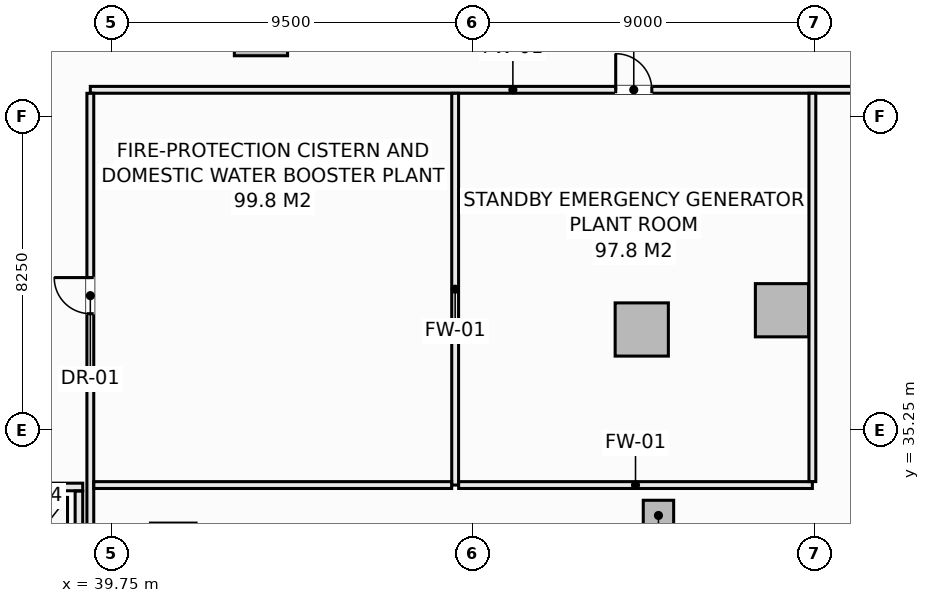
"""IFC4 building model, lengths in metres.
Left out: names, types, materials, properties, quantities, classifications, styles, units other than length and angle.
Written with IfcOpenShell. Run it as: python <this file> out.ifc"""

import sys

from ifc_helpers import new_model, si_unit, direction, frame, frame_2d, origin, origin_2d, place, context, subcontext, project, spatial, rectangle, extrude, element, fill, save


model = new_model("IFC4")
c1 = context("Model", 3, precision=1e-05, world=origin(), true_north=direction((0.0, 1.0)))
c2 = subcontext(c1, "Body", "Model", "MODEL_VIEW")
j1 = project(units=[si_unit("LENGTHUNIT", "METRE"), si_unit("PLANEANGLEUNIT", "RADIAN")], contexts=[c1])
p1 = place(None, origin())
s1 = spatial("IfcSite", under=j1, at=p1, CompositionType="ELEMENT")
p2 = place(p1, origin())
s2 = spatial("IfcBuilding", under=s1, at=p2, CompositionType="ELEMENT")
p3 = place(p2, frame((0.0, 0.0, -13.5)))
s3 = spatial("IfcBuildingStorey", under=s2, at=p3, CompositionType="ELEMENT", Elevation=-13.5)
for number, where, z_axis, x_axis in (
    (1, (53.71, 37.894, -0.5), (0.0, 0.0, 1.0), (1.0, 0.0, 0.0)),
    (2, (43.69, 45.796, -0.5), (0.0, 0.0, 1.0), (1.0, 0.0, 0.0)),
    (3, (57.4, 38.4, -0.5), (0.0, 0.0, 1.0), (1.0, 0.0, 0.0)),
):
    element("IfcColumn", number, at=place(p3, frame(where, z_axis=z_axis, x_axis=x_axis)), inside=s3, PredefinedType="COLUMN", context=c2, shape_type="SweptSolid", body=[
        extrude(rectangle(XDim=1.4, YDim=1.4, at=origin_2d()), origin(), (0.0, 0.0, 1.0), 4.68),
    ])
p4 = place(p3, frame((54.15, 33.0, -0.5), z_axis=(0.0, 0.0, 1.0), x_axis=(1.0, 0.0, 0.0)))
e4 = element("IfcColumn", 4, at=p4, inside=s3, PredefinedType="PILASTER", context=c2, shape_type="SweptSolid", body=[
    extrude(rectangle(XDim=0.8, YDim=0.8, at=origin_2d()), origin(), (0.0, 0.0, 1.0), 4.68),
])
p5 = place(p3, frame((36.75, 33.75, 0.0), z_axis=(0.0, 0.0, 1.0), x_axis=(1.0, 0.0, 0.0)))
e5 = element("IfcWall", 5, at=p5, inside=s3, PredefinedType="SOLIDWALL", context=c2, shape_type="SweptSolid", body=[
    extrude(rectangle(XDim=2.25, YDim=0.2, at=frame_2d((1.125, 0.0))), origin(), (0.0, 0.0, 1.0), 4.18),
])
p6 = place(p3, frame((38.9, 31.21, 0.0), z_axis=(0.0, 0.0, 1.0), x_axis=(0.0, 1.0, 0.0)))
e6 = element("IfcWall", 6, at=p6, inside=s3, PredefinedType="SOLIDWALL", context=c2, shape_type="SweptSolid", body=[
    extrude(rectangle(XDim=2.43, YDim=0.2, at=frame_2d((1.215, 0.0))), origin(), (0.0, 0.0, 1.0), 4.18),
])
p7 = place(p3, frame((39.2, 44.2, 0.0), z_axis=(0.0, 0.0, 1.0), x_axis=(1.0, 0.0, 0.0)))
e7 = element("IfcWall", 7, at=p7, inside=s3, PredefinedType="SOLIDWALL", context=c2, shape_type="SweptSolid", body=[
    extrude(rectangle(XDim=22.238, YDim=0.18, at=frame_2d((11.119, 0.0))), origin(), (0.0, 0.0, 1.0), 3.703),
])
p8 = place(p7, frame((13.825, 0.0, 0.0)))
e8 = element("IfcOpeningElement", 8, at=p8, cuts=e7, PredefinedType="OPENING", context=c2, shape_type="SweptSolid", body=[
    extrude(rectangle(XDim=0.95, YDim=2.1, at=frame_2d((0.475, 1.05))), frame((0.0, 0.1, 0.0), z_axis=(0.0, -1.0, 0.0), x_axis=(1.0, 0.0, 0.0)), (0.0, 0.0, 1.0), 0.2),
])
p9 = place(p3, frame((39.2, 28.997, 0.0), z_axis=(0.0, 0.0, 1.0), x_axis=(0.0, 1.0, 0.0)))
e9 = element("IfcWall", 9, at=p9, inside=s3, PredefinedType="SOLIDWALL", context=c2, shape_type="SweptSolid", body=[
    extrude(rectangle(XDim=15.111, YDim=0.18, at=frame_2d((7.555, 0.0))), origin(), (0.0, 0.0, 1.0), 3.414),
])
p10 = place(p9, frame((9.312, 0.0, 0.0)))
e10 = element("IfcOpeningElement", 10, at=p10, cuts=e9, PredefinedType="OPENING", context=c2, shape_type="SweptSolid", body=[
    extrude(rectangle(XDim=0.95, YDim=2.1, at=frame_2d((0.475, 1.05))), frame((0.0, 0.1, 0.0), z_axis=(0.0, -1.0, 0.0), x_axis=(1.0, 0.0, 0.0)), (0.0, 0.0, 1.0), 0.2),
])
p11 = place(p3, frame((48.8, 33.8, 0.0), z_axis=(0.0, 0.0, 1.0), x_axis=(0.0, 1.0, 0.0)))
e11 = element("IfcWall", 11, at=p11, inside=s3, PredefinedType="SOLIDWALL", context=c2, shape_type="SweptSolid", body=[
    extrude(rectangle(XDim=10.308, YDim=0.18, at=frame_2d((5.154, 0.0))), origin(), (0.0, 0.0, 1.0), 4.18),
])
p12 = place(p3, frame((39.292, 33.8, 0.0), z_axis=(0.0, 0.0, 1.0), x_axis=(1.0, 0.0, 0.0)))
e12 = element("IfcWall", 12, at=p12, inside=s3, PredefinedType="SOLIDWALL", context=c2, shape_type="SweptSolid", body=[
    extrude(rectangle(XDim=9.416, YDim=0.18, at=frame_2d((4.708, 0.0))), origin(), (0.0, 0.0, 1.0), 3.815),
])
p13 = place(p3, frame((48.892, 33.8, 0.0), z_axis=(0.0, 0.0, 1.0), x_axis=(1.0, 0.0, 0.0)))
e13 = element("IfcWall", 13, at=p13, inside=s3, PredefinedType="SOLIDWALL", context=c2, shape_type="SweptSolid", body=[
    extrude(rectangle(XDim=9.308, YDim=0.18, at=frame_2d((4.654, 0.0))), origin(), (0.0, 0.0, 1.0), 4.18),
])
p14 = place(p3, frame((58.2, 33.892, 0.0), z_axis=(0.0, 0.0, 1.0), x_axis=(0.0, 1.0, 0.0)))
e14 = element("IfcWall", 14, at=p14, inside=s3, PredefinedType="SOLIDWALL", context=c2, shape_type="SweptSolid", body=[
    extrude(rectangle(XDim=10.216, YDim=0.18, at=frame_2d((5.108, 0.0))), origin(), (0.0, 0.0, 1.0), 4.18),
])
p15 = place(p10, origin())
e15 = element("IfcDoor", 15, at=p15, inside=s3, OperationType="SINGLE_SWING_RIGHT", PredefinedType="DOOR", context=c2, shape_type="SweptSolid", body=[
    extrude(rectangle(XDim=0.95, YDim=2.1, at=frame_2d((0.475, 1.05))), frame((0.0, 0.025, 0.0), z_axis=(0.0, -1.0, 0.0), x_axis=(1.0, 0.0, 0.0)), (0.0, 0.0, 1.0), 0.05),
])
fill(e10, e15)
p16 = place(p8, origin())
e16 = element("IfcDoor", 16, at=p16, inside=s3, OperationType="SINGLE_SWING_LEFT", PredefinedType="DOOR", context=c2, shape_type="SweptSolid", body=[
    extrude(rectangle(XDim=0.95, YDim=2.1, at=frame_2d((0.475, 1.05))), frame((0.0, 0.025, 0.0), z_axis=(0.0, -1.0, 0.0), x_axis=(1.0, 0.0, 0.0)), (0.0, 0.0, 1.0), 0.05),
])
fill(e8, e16)
save(model, sys.argv[1])
